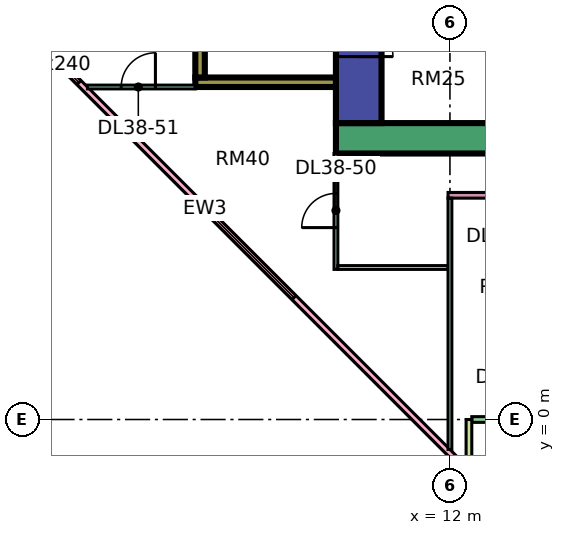
"""IFC4 building model, lengths in metres.
Left out: names, types, materials, properties, quantities, classifications, styles, units other than length and angle.
Written with IfcOpenShell. Run it as: python <this file> out.ifc"""

import sys

from ifc_helpers import new_model, si_unit, direction, frame, frame_2d, origin, place, context, subcontext, project, spatial, rectangle, extrude, element, fill, save


model = new_model("IFC4")
c1 = context("Model", 3, precision=1e-05, world=origin(), true_north=direction((0.0, 1.0)))
c2 = subcontext(c1, "Body", "Model", "MODEL_VIEW")
j1 = project(units=[si_unit("LENGTHUNIT", "METRE"), si_unit("PLANEANGLEUNIT", "RADIAN")], contexts=[c1])
p1 = place(None, origin())
s1 = spatial("IfcSite", under=j1, at=p1, CompositionType="ELEMENT")
p2 = place(p1, origin())
s2 = spatial("IfcBuilding", under=s1, at=p2, CompositionType="ELEMENT")
p3 = place(p2, frame((0.0, 0.0, 168.65)))
s3 = spatial("IfcBuildingStorey", under=s2, at=p3, CompositionType="ELEMENT", Elevation=168.65)
p4 = place(p3, frame((9.0, 7.4, 0.0), z_axis=(0.0, 0.0, 1.0), x_axis=(1.0, 0.0, 0.0)))
e1 = element("IfcWall", 1, at=p4, inside=s3, PredefinedType="SHEAR", context=c2, shape_type="SweptSolid", body=[
    extrude(rectangle(XDim=25.0, YDim=0.8, at=frame_2d((12.5, 0.0))), origin(), (0.0, 0.0, 1.0), 3.75),
])
p5 = place(p3, frame((9.6, 7.8, 0.0), z_axis=(0.0, 0.0, 1.0), x_axis=(0.0, 1.0, 0.0)))
e2 = element("IfcWall", 2, at=p5, inside=s3, PredefinedType="SHEAR", context=c2, shape_type="SweptSolid", body=[
    extrude(rectangle(XDim=11.4, YDim=1.2, at=frame_2d((5.7, 0.0))), origin(), (0.0, 0.0, 1.0), 3.75),
])
p6 = place(p5, frame((4.075, 0.0, 0.0)))
e3 = element("IfcOpeningElement", 3, at=p6, cuts=e2, PredefinedType="OPENING", context=c2, shape_type="SweptSolid", body=[
    extrude(rectangle(XDim=1.1, YDim=2.2, at=frame_2d((0.55, 1.1))), frame((0.0, 0.61, 0.0), z_axis=(0.0, -1.0, 0.0), x_axis=(1.0, 0.0, 0.0)), (0.0, 0.0, 1.0), 1.22),
])
p7 = place(p5, frame((6.575, 0.0, 0.0)))
e4 = element("IfcOpeningElement", 4, at=p7, cuts=e2, PredefinedType="OPENING", context=c2, shape_type="SweptSolid", body=[
    extrude(rectangle(XDim=1.1, YDim=2.2, at=frame_2d((0.55, 1.1))), frame((0.0, 0.61, 0.0), z_axis=(0.0, -1.0, 0.0), x_axis=(1.0, 0.0, 0.0)), (0.0, 0.0, 1.0), 1.22),
])
p8 = place(p5, frame((9.4, 0.0, 0.0)))
e5 = element("IfcOpeningElement", 5, at=p8, cuts=e2, PredefinedType="OPENING", context=c2, shape_type="SweptSolid", body=[
    extrude(rectangle(XDim=1.1, YDim=2.2, at=frame_2d((0.55, 1.1))), frame((0.0, 0.61, 0.0), z_axis=(0.0, -1.0, 0.0), x_axis=(1.0, 0.0, 0.0)), (0.0, 0.0, 1.0), 1.22),
])
p9 = place(p5, frame((1.75, 0.0, 0.0)))
e6 = element("IfcOpeningElement", 6, at=p9, cuts=e2, PredefinedType="OPENING", context=c2, shape_type="SweptSolid", body=[
    extrude(rectangle(XDim=0.9, YDim=2.1, at=frame_2d((0.45, 1.05))), frame((0.0, 0.61, 0.0), z_axis=(0.0, -1.0, 0.0), x_axis=(1.0, 0.0, 0.0)), (0.0, 0.0, 1.0), 1.22),
])
p10 = place(p3, frame((5.3, 8.875, 0.0), z_axis=(0.0, 0.0, 1.0), x_axis=(1.0, 0.0, 0.0)))
e7 = element("IfcWall", 7, at=p10, inside=s3, PredefinedType="SHEAR", context=c2, shape_type="SweptSolid", body=[
    extrude(rectangle(XDim=3.7, YDim=0.25, at=frame_2d((1.85, 0.0))), origin(), (0.0, 0.0, 1.0), 3.75),
])
p11 = place(p3, frame((5.425, 9.0, 0.0), z_axis=(0.0, 0.0, 1.0), x_axis=(0.0, 1.0, 0.0)))
e8 = element("IfcWall", 8, at=p11, inside=s3, PredefinedType="SHEAR", context=c2, shape_type="SweptSolid", body=[
    extrude(rectangle(XDim=4.0, YDim=0.25, at=frame_2d((2.0, 0.0))), origin(), (0.0, 0.0, 1.0), 3.75),
])
p12 = place(p3, frame((-1.447, 12.553, 0.0), z_axis=(0.0, 0.0, 1.0), x_axis=(0.707106781187, -0.707106781187, 0.0)))
e9 = element("IfcWall", 9, at=p12, inside=s3, PredefinedType="SOLIDWALL", context=c2, shape_type="SweptSolid", body=[
    extrude(rectangle(XDim=19.799, YDim=0.15, at=frame_2d((9.899, 0.0))), origin(), (0.0, 0.0, 1.0), 3.35),
])
p13 = place(p12, frame((2.212, 0.0, 0.45)))
e10 = element("IfcOpeningElement", 10, at=p13, cuts=e9, PredefinedType="OPENING", context=c2, shape_type="SweptSolid", body=[
    extrude(rectangle(XDim=3.0, YDim=2.4, at=frame_2d((1.5, 1.2))), frame((0.0, 0.085, 0.0), z_axis=(0.0, -1.0, 0.0), x_axis=(1.0, 0.0, 0.0)), (0.0, 0.0, 1.0), 0.17),
])
p14 = place(p12, frame((10.216, 0.0, 0.45)))
e11 = element("IfcOpeningElement", 11, at=p14, cuts=e9, PredefinedType="OPENING", context=c2, shape_type="SweptSolid", body=[
    extrude(rectangle(XDim=3.0, YDim=2.4, at=frame_2d((1.5, 1.2))), frame((0.0, 0.085, 0.0), z_axis=(0.0, -1.0, 0.0), x_axis=(1.0, 0.0, 0.0)), (0.0, 0.0, 1.0), 0.17),
])
p15 = place(p3, frame((12.575, 0.0, 0.0), z_axis=(0.0, 0.0, 1.0), x_axis=(1.0, 0.0, 0.0)))
e12 = element("IfcWall", 12, at=p15, inside=s3, PredefinedType="SOLIDWALL", context=c2, shape_type="SweptSolid", body=[
    extrude(rectangle(XDim=11.35, YDim=0.15, at=frame_2d((5.675, 0.0))), origin(), (0.0, 0.0, 1.0), 3.35),
])
p16 = place(p15, frame((0.613, 0.0, 0.0)))
e13 = element("IfcOpeningElement", 13, at=p16, cuts=e12, PredefinedType="OPENING", context=c2, shape_type="SweptSolid", body=[
    extrude(rectangle(XDim=1.2, YDim=2.4, at=frame_2d((0.6, 1.2))), frame((0.0, 0.085, 0.0), z_axis=(0.0, -1.0, 0.0), x_axis=(1.0, 0.0, 0.0)), (0.0, 0.0, 1.0), 0.17),
])
p17 = place(p15, frame((3.025, 0.0, 0.45)))
e14 = element("IfcOpeningElement", 14, at=p17, cuts=e12, PredefinedType="OPENING", context=c2, shape_type="SweptSolid", body=[
    extrude(rectangle(XDim=1.8, YDim=2.4, at=frame_2d((0.9, 1.2))), frame((0.0, 0.085, 0.0), z_axis=(0.0, -1.0, 0.0), x_axis=(1.0, 0.0, 0.0)), (0.0, 0.0, 1.0), 0.17),
])
p18 = place(p15, frame((6.65, 0.0, 0.45)))
e15 = element("IfcOpeningElement", 15, at=p18, cuts=e12, PredefinedType="OPENING", context=c2, shape_type="SweptSolid", body=[
    extrude(rectangle(XDim=3.0, YDim=2.4, at=frame_2d((1.5, 1.2))), frame((0.0, 0.085, 0.0), z_axis=(0.0, -1.0, 0.0), x_axis=(1.0, 0.0, 0.0)), (0.0, 0.0, 1.0), 0.17),
])
p19 = place(p3, frame((12.5, -1.5, 0.0), z_axis=(0.0, 0.0, 1.0), x_axis=(0.0, 1.0, 0.0)))
e16 = element("IfcWall", 16, at=p19, inside=s3, PredefinedType="SOLIDWALL", context=c2, shape_type="SweptSolid", body=[
    extrude(rectangle(XDim=1.5, YDim=0.15, at=frame_2d((0.75, 0.0))), origin(), (0.0, 0.0, 1.0), 3.35),
])
p20 = place(p3, frame((2.461, 8.75, 0.0), z_axis=(0.0, 0.0, 1.0), x_axis=(1.0, 0.0, 0.0)))
e17 = element("IfcWall", 17, at=p20, inside=s3, PredefinedType="PARTITIONING", context=c2, shape_type="SweptSolid", body=[
    extrude(rectangle(XDim=2.839, YDim=0.1, at=frame_2d((1.419, 0.0))), origin(), (0.0, 0.0, 1.0), 3.35),
])
p21 = place(p20, frame((0.889, 0.0, 0.0)))
e18 = element("IfcOpeningElement", 18, at=p21, cuts=e17, PredefinedType="OPENING", context=c2, shape_type="SweptSolid", body=[
    extrude(rectangle(XDim=0.9, YDim=2.1, at=frame_2d((0.45, 1.05))), frame((0.0, 0.06, 0.0), z_axis=(0.0, -1.0, 0.0), x_axis=(1.0, 0.0, 0.0)), (0.0, 0.0, 1.0), 0.12),
])
p22 = place(p3, frame((9.0, 3.95, 0.0), z_axis=(0.0, 0.0, 1.0), x_axis=(0.0, 1.0, 0.0)))
e19 = element("IfcWall", 19, at=p22, inside=s3, PredefinedType="PARTITIONING", context=c2, shape_type="SweptSolid", body=[
    extrude(rectangle(XDim=3.05, YDim=0.1, at=frame_2d((1.525, 0.0))), origin(), (0.0, 0.0, 1.0), 3.35),
])
p23 = place(p22, frame((1.1, 0.0, 0.0)))
e20 = element("IfcOpeningElement", 20, at=p23, cuts=e19, PredefinedType="OPENING", context=c2, shape_type="SweptSolid", body=[
    extrude(rectangle(XDim=0.9, YDim=2.1, at=frame_2d((0.45, 1.05))), frame((0.0, 0.06, 0.0), z_axis=(0.0, -1.0, 0.0), x_axis=(1.0, 0.0, 0.0)), (0.0, 0.0, 1.0), 0.12),
])
p24 = place(p3, frame((9.05, 4.0, 0.0), z_axis=(0.0, 0.0, 1.0), x_axis=(1.0, 0.0, 0.0)))
e21 = element("IfcWall", 21, at=p24, inside=s3, PredefinedType="PARTITIONING", context=c2, shape_type="SweptSolid", body=[
    extrude(rectangle(XDim=2.9, YDim=0.1, at=frame_2d((1.45, 0.0))), origin(), (0.0, 0.0, 1.0), 3.35),
])
p25 = place(p3, frame((11.95, 5.9, 0.0), z_axis=(0.0, 0.0, 1.0), x_axis=(1.0, 0.0, 0.0)))
e22 = element("IfcWall", 22, at=p25, inside=s3, PredefinedType="PARTITIONING", context=c2, shape_type="SweptSolid", body=[
    extrude(rectangle(XDim=21.1, YDim=0.15, at=frame_2d((10.55, 0.0))), origin(), (0.0, 0.0, 1.0), 3.35),
])
p26 = place(p25, frame((1.1, 0.0, 0.0)))
e23 = element("IfcOpeningElement", 23, at=p26, cuts=e22, PredefinedType="OPENING", context=c2, shape_type="SweptSolid", body=[
    extrude(rectangle(XDim=0.9, YDim=2.1, at=frame_2d((0.45, 1.05))), frame((0.0, 0.085, 0.0), z_axis=(0.0, -1.0, 0.0), x_axis=(1.0, 0.0, 0.0)), (0.0, 0.0, 1.0), 0.17),
])
p27 = place(p25, frame((4.1, 0.0, 0.0)))
e24 = element("IfcOpeningElement", 24, at=p27, cuts=e22, PredefinedType="OPENING", context=c2, shape_type="SweptSolid", body=[
    extrude(rectangle(XDim=0.9, YDim=2.1, at=frame_2d((0.45, 1.05))), frame((0.0, 0.085, 0.0), z_axis=(0.0, -1.0, 0.0), x_axis=(1.0, 0.0, 0.0)), (0.0, 0.0, 1.0), 0.17),
])
p28 = place(p25, frame((10.1, 0.0, 0.0)))
e25 = element("IfcOpeningElement", 25, at=p28, cuts=e22, PredefinedType="OPENING", context=c2, shape_type="SweptSolid", body=[
    extrude(rectangle(XDim=0.9, YDim=2.1, at=frame_2d((0.45, 1.05))), frame((0.0, 0.085, 0.0), z_axis=(0.0, -1.0, 0.0), x_axis=(1.0, 0.0, 0.0)), (0.0, 0.0, 1.0), 0.17),
])
p29 = place(p3, frame((12.0, -0.788, 0.0), z_axis=(0.0, 0.0, 1.0), x_axis=(0.0, 1.0, 0.0)))
e26 = element("IfcWall", 26, at=p29, inside=s3, PredefinedType="PARTITIONING", context=c2, shape_type="SweptSolid", body=[
    extrude(rectangle(XDim=6.613, YDim=0.1, at=frame_2d((3.306, 0.0))), origin(), (0.0, 0.0, 1.0), 3.35),
])
p30 = place(p13, origin())
e27 = element("IfcWindow", 27, at=p30, inside=s3, PartitioningType="SINGLE_PANEL", PredefinedType="WINDOW", context=c2, shape_type="SweptSolid", body=[
    extrude(rectangle(XDim=3.0, YDim=2.4, at=frame_2d((1.5, 1.2))), frame((0.0, 0.03, 0.0), z_axis=(0.0, -1.0, 0.0), x_axis=(1.0, 0.0, 0.0)), (0.0, 0.0, 1.0), 0.06),
])
fill(e10, e27)
p31 = place(p14, origin())
e28 = element("IfcWindow", 28, at=p31, inside=s3, PartitioningType="SINGLE_PANEL", PredefinedType="WINDOW", context=c2, shape_type="SweptSolid", body=[
    extrude(rectangle(XDim=3.0, YDim=2.4, at=frame_2d((1.5, 1.2))), frame((0.0, 0.03, 0.0), z_axis=(0.0, -1.0, 0.0), x_axis=(1.0, 0.0, 0.0)), (0.0, 0.0, 1.0), 0.06),
])
fill(e11, e28)
p32 = place(p9, frame((0.9, 0.0, 0.0), z_axis=(0.0, 0.0, 1.0), x_axis=(-1.0, 0.0, 0.0)))
e29 = element("IfcDoor", 29, at=p32, inside=s3, OperationType="SINGLE_SWING_LEFT", PredefinedType="DOOR", context=c2, shape_type="SweptSolid", body=[
    extrude(rectangle(XDim=0.9, YDim=2.1, at=frame_2d((0.45, 1.05))), frame((0.0, 0.025, 0.0), z_axis=(0.0, -1.0, 0.0), x_axis=(1.0, 0.0, 0.0)), (0.0, 0.0, 1.0), 0.05),
])
fill(e6, e29)
p33 = place(p23, origin())
e30 = element("IfcDoor", 30, at=p33, inside=s3, OperationType="SINGLE_SWING_LEFT", PredefinedType="DOOR", context=c2, shape_type="SweptSolid", body=[
    extrude(rectangle(XDim=0.9, YDim=2.1, at=frame_2d((0.45, 1.05))), frame((0.0, 0.025, 0.0), z_axis=(0.0, -1.0, 0.0), x_axis=(1.0, 0.0, 0.0)), (0.0, 0.0, 1.0), 0.05),
])
fill(e20, e30)
p34 = place(p21, frame((0.9, 0.0, 0.0), z_axis=(0.0, 0.0, 1.0), x_axis=(-1.0, 0.0, 0.0)))
e31 = element("IfcDoor", 31, at=p34, inside=s3, OperationType="SINGLE_SWING_RIGHT", PredefinedType="DOOR", context=c2, shape_type="SweptSolid", body=[
    extrude(rectangle(XDim=0.9, YDim=2.1, at=frame_2d((0.45, 1.05))), frame((0.0, 0.025, 0.0), z_axis=(0.0, -1.0, 0.0), x_axis=(1.0, 0.0, 0.0)), (0.0, 0.0, 1.0), 0.05),
])
fill(e18, e31)
save(model, sys.argv[1])
